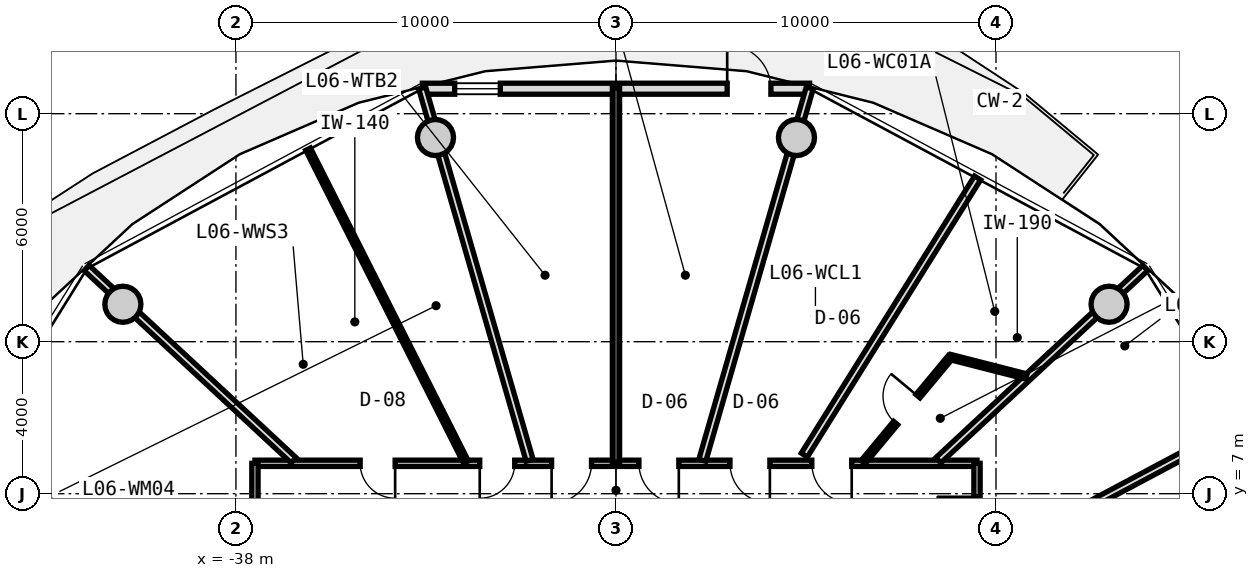
"""IFC4 building model, lengths in metres.
Left out: names, types, materials, properties, quantities, classifications, styles, units other than length and angle.
Written with IfcOpenShell. Run it as: python <this file> out.ifc"""

import sys

from ifc_helpers import new_model, si_unit, direction, frame, frame_2d, origin, origin_2d, place, context, subcontext, project, spatial, rectangle, circle, extrude, source, transform, mapped, element, fill, save


model = new_model("IFC4")
c1 = context("Model", 3, precision=1e-05, world=origin(), true_north=direction((0.0, 1.0)))
c2 = subcontext(c1, "Body", "Model", "MODEL_VIEW")
j1 = project(units=[si_unit("LENGTHUNIT", "METRE"), si_unit("PLANEANGLEUNIT", "RADIAN")], contexts=[c1])
p1 = place(None, origin())
s1 = spatial("IfcSite", under=j1, at=p1, CompositionType="ELEMENT")
p2 = place(p1, origin())
s2 = spatial("IfcBuilding", under=s1, at=p2, CompositionType="ELEMENT")
p3 = place(p2, frame((0.0, 0.0, 24.65)))
s3 = spatial("IfcBuildingStorey", under=s2, at=p3, CompositionType="ELEMENT", Elevation=24.65)
m1 = source(origin(), c2, "Body", "SweptSolid", [
    extrude(circle(Radius=0.475, at=origin_2d()), origin(), (0.0, 0.0, 1.0), 3.05),
])
for number, where, z_axis, x_axis in (
    (1, (-15.025, 11.985, 0.0), (0.0, 0.0, 1.0), (1.0, 0.0, 0.0)),
    (2, (-23.251, 16.373, 0.0), (0.0, 0.0, 1.0), (1.0, 0.0, 0.0)),
    (3, (-32.749, 16.373, 0.0), (0.0, 0.0, 1.0), (1.0, 0.0, 0.0)),
    (4, (-40.975, 11.985, 0.0), (0.0, 0.0, 1.0), (1.0, 0.0, 0.0)),
):
    element("IfcColumn", number, at=place(p3, frame(where, z_axis=z_axis, x_axis=x_axis)), inside=s3, PredefinedType="COLUMN", context=c2, shape_type="MappedRepresentation", body=[
        mapped(m1, transform((0.0, 0.0, 0.0), x_axis=(1.0, 0.0, 0.0), y_axis=(0.0, 1.0, 0.0), z_axis=(0.0, 0.0, 1.0), scale=1.0)),
    ])
m2 = source(origin(), c2, "Body", "SweptSolid", [
    extrude(rectangle(XDim=10.187, YDim=0.29, at=frame_2d((5.094, 0.0))), origin(), (0.0, 0.0, 1.0), 2.79),
])
p4 = place(p3, frame((-33.094, 17.657, 0.0), z_axis=(0.0, 0.0, 1.0), x_axis=(1.0, 0.0, 0.0)))
e5 = element("IfcWall", 5, at=p4, inside=s3, PredefinedType="SOLIDWALL", context=c2, shape_type="MappedRepresentation", body=[
    mapped(m2, transform((0.0, 0.0, 0.0), x_axis=(1.0, 0.0, 0.0), y_axis=(0.0, 1.0, 0.0), z_axis=(0.0, 0.0, 1.0), scale=1.0)),
])
p5 = place(p4, frame((8.02, 0.0, 0.0)))
e6 = element("IfcOpeningElement", 6, at=p5, cuts=e5, PredefinedType="OPENING", context=c2, shape_type="SweptSolid", body=[
    extrude(rectangle(XDim=1.15, YDim=2.25, at=frame_2d((0.575, 1.125))), frame((0.0, 0.155, 0.0), z_axis=(0.0, -1.0, 0.0), x_axis=(1.0, 0.0, 0.0)), (0.0, 0.0, 1.0), 0.31),
])
p6 = place(p4, frame((0.85, 0.0, 0.85)))
e7 = element("IfcOpeningElement", 7, at=p6, cuts=e5, PredefinedType="OPENING", context=c2, shape_type="SweptSolid", body=[
    extrude(rectangle(XDim=1.2, YDim=1.5, at=frame_2d((0.6, 0.75))), frame((0.0, 0.155, 0.0), z_axis=(0.0, -1.0, 0.0), x_axis=(1.0, 0.0, 0.0)), (0.0, 0.0, 1.0), 0.31),
])
m3 = source(origin(), c2, "Body", "SweptSolid", [
    extrude(rectangle(XDim=19.0, YDim=0.165, at=frame_2d((9.5, 0.0))), origin(), (0.0, 0.0, 1.0), 2.775),
])
p7 = place(p3, frame((-37.5, 7.8, 0.0), z_axis=(0.0, 0.0, 1.0), x_axis=(1.0, 0.0, 0.0)))
e8 = element("IfcWall", 8, at=p7, inside=s3, PredefinedType="PARTITIONING", context=c2, shape_type="MappedRepresentation", body=[
    mapped(m3, transform((0.0, 0.0, 0.0), x_axis=(1.0, 0.0, 0.0), y_axis=(0.0, 1.0, 0.0), z_axis=(0.0, 0.0, 1.0), scale=1.0)),
])
p8 = place(p7, frame((14.653, 0.0, 0.0)))
e9 = element("IfcOpeningElement", 9, at=p8, cuts=e8, PredefinedType="OPENING", context=c2, shape_type="SweptSolid", body=[
    extrude(rectangle(XDim=1.05, YDim=2.15, at=frame_2d((0.525, 1.075))), frame((0.0, 0.093, 0.0), z_axis=(0.0, -1.0, 0.0), x_axis=(1.0, 0.0, 0.0)), (0.0, 0.0, 1.0), 0.185),
])
p9 = place(p7, frame((12.5, 0.0, 0.0)))
e10 = element("IfcOpeningElement", 10, at=p9, cuts=e8, PredefinedType="OPENING", context=c2, shape_type="SweptSolid", body=[
    extrude(rectangle(XDim=1.05, YDim=2.15, at=frame_2d((0.525, 1.075))), frame((0.0, 0.093, 0.0), z_axis=(0.0, -1.0, 0.0), x_axis=(1.0, 0.0, 0.0)), (0.0, 0.0, 1.0), 0.185),
])
p10 = place(p7, frame((10.104, 0.0, 0.0)))
e11 = element("IfcOpeningElement", 11, at=p10, cuts=e8, PredefinedType="OPENING", context=c2, shape_type="SweptSolid", body=[
    extrude(rectangle(XDim=1.05, YDim=2.15, at=frame_2d((0.525, 1.075))), frame((0.0, 0.093, 0.0), z_axis=(0.0, -1.0, 0.0), x_axis=(1.0, 0.0, 0.0)), (0.0, 0.0, 1.0), 0.185),
])
p11 = place(p7, frame((7.806, 0.0, 0.0)))
e12 = element("IfcOpeningElement", 12, at=p11, cuts=e8, PredefinedType="OPENING", context=c2, shape_type="SweptSolid", body=[
    extrude(rectangle(XDim=1.05, YDim=2.15, at=frame_2d((0.525, 1.075))), frame((0.0, 0.093, 0.0), z_axis=(0.0, -1.0, 0.0), x_axis=(1.0, 0.0, 0.0)), (0.0, 0.0, 1.0), 0.185),
])
p12 = place(p7, frame((5.915, 0.0, 0.0)))
e13 = element("IfcOpeningElement", 13, at=p12, cuts=e8, PredefinedType="OPENING", context=c2, shape_type="SweptSolid", body=[
    extrude(rectangle(XDim=0.92, YDim=2.1, at=frame_2d((0.46, 1.05))), frame((0.0, 0.093, 0.0), z_axis=(0.0, -1.0, 0.0), x_axis=(1.0, 0.0, 0.0)), (0.0, 0.0, 1.0), 0.185),
])
p13 = place(p7, frame((2.769, 0.0, 0.0)))
e14 = element("IfcOpeningElement", 14, at=p13, cuts=e8, PredefinedType="OPENING", context=c2, shape_type="SweptSolid", body=[
    extrude(rectangle(XDim=0.92, YDim=2.1, at=frame_2d((0.46, 1.05))), frame((0.0, 0.093, 0.0), z_axis=(0.0, -1.0, 0.0), x_axis=(1.0, 0.0, 0.0)), (0.0, 0.0, 1.0), 0.185),
])
m4 = source(origin(), c2, "Body", "SweptSolid", [
    extrude(rectangle(XDim=15.6, YDim=0.165, at=frame_2d((7.8, 0.0))), origin(), (0.0, 0.0, 1.0), 2.775),
])
p14 = place(p3, frame((-37.5, -7.8, 0.0), z_axis=(0.0, 0.0, 1.0), x_axis=(0.0, 1.0, 0.0)))
e15 = element("IfcWall", 15, at=p14, inside=s3, PredefinedType="PARTITIONING", context=c2, shape_type="MappedRepresentation", body=[
    mapped(m4, transform((0.0, 0.0, 0.0), x_axis=(1.0, 0.0, 0.0), y_axis=(0.0, 1.0, 0.0), z_axis=(0.0, 0.0, 1.0), scale=1.0)),
])
p15 = place(p14, frame((12.141, 0.0, 0.0)))
e16 = element("IfcOpeningElement", 16, at=p15, cuts=e15, PredefinedType="OPENING", context=c2, shape_type="SweptSolid", body=[
    extrude(rectangle(XDim=1.25, YDim=2.2, at=frame_2d((0.625, 1.1))), frame((0.0, 0.093, 0.0), z_axis=(0.0, -1.0, 0.0), x_axis=(1.0, 0.0, 0.0)), (0.0, 0.0, 1.0), 0.185),
])
p16 = place(p14, frame((7.175, 0.0, 0.0)))
e17 = element("IfcOpeningElement", 17, at=p16, cuts=e15, PredefinedType="OPENING", context=c2, shape_type="SweptSolid", body=[
    extrude(rectangle(XDim=1.25, YDim=2.2, at=frame_2d((0.625, 1.1))), frame((0.0, 0.093, 0.0), z_axis=(0.0, -1.0, 0.0), x_axis=(1.0, 0.0, 0.0)), (0.0, 0.0, 1.0), 0.185),
])
p17 = place(p14, frame((2.208, 0.0, 0.0)))
e18 = element("IfcOpeningElement", 18, at=p17, cuts=e15, PredefinedType="OPENING", context=c2, shape_type="SweptSolid", body=[
    extrude(rectangle(XDim=1.25, YDim=2.2, at=frame_2d((0.625, 1.1))), frame((0.0, 0.093, 0.0), z_axis=(0.0, -1.0, 0.0), x_axis=(1.0, 0.0, 0.0)), (0.0, 0.0, 1.0), 0.185),
])
p18 = place(p3, frame((-18.5, 7.8, 0.0), z_axis=(0.0, 0.0, 1.0), x_axis=(0.0, -1.0, 0.0)))
e19 = element("IfcWall", 19, at=p18, inside=s3, PredefinedType="PARTITIONING", context=c2, shape_type="MappedRepresentation", body=[
    mapped(m4, transform((0.0, 0.0, 0.0), x_axis=(1.0, 0.0, 0.0), y_axis=(0.0, 1.0, 0.0), z_axis=(0.0, 0.0, 1.0), scale=1.0)),
])
p19 = place(p18, frame((12.141, 0.0, 0.0)))
e20 = element("IfcOpeningElement", 20, at=p19, cuts=e19, PredefinedType="OPENING", context=c2, shape_type="SweptSolid", body=[
    extrude(rectangle(XDim=1.25, YDim=2.2, at=frame_2d((0.625, 1.1))), frame((0.0, 0.093, 0.0), z_axis=(0.0, -1.0, 0.0), x_axis=(1.0, 0.0, 0.0)), (0.0, 0.0, 1.0), 0.185),
])
p20 = place(p18, frame((7.175, 0.0, 0.0)))
e21 = element("IfcOpeningElement", 21, at=p20, cuts=e19, PredefinedType="OPENING", context=c2, shape_type="SweptSolid", body=[
    extrude(rectangle(XDim=1.25, YDim=2.2, at=frame_2d((0.625, 1.1))), frame((0.0, 0.093, 0.0), z_axis=(0.0, -1.0, 0.0), x_axis=(1.0, 0.0, 0.0)), (0.0, 0.0, 1.0), 0.185),
])
p21 = place(p18, frame((2.826, 0.0, 0.0)))
e22 = element("IfcOpeningElement", 22, at=p21, cuts=e19, PredefinedType="OPENING", context=c2, shape_type="SweptSolid", body=[
    extrude(rectangle(XDim=1.05, YDim=2.15, at=frame_2d((0.525, 1.075))), frame((0.0, 0.093, 0.0), z_axis=(0.0, -1.0, 0.0), x_axis=(1.0, 0.0, 0.0)), (0.0, 0.0, 1.0), 0.185),
])
p22 = place(p18, frame((0.881, 0.0, 0.0)))
e23 = element("IfcOpeningElement", 23, at=p22, cuts=e19, PredefinedType="OPENING", context=c2, shape_type="SweptSolid", body=[
    extrude(rectangle(XDim=1.05, YDim=2.15, at=frame_2d((0.525, 1.075))), frame((0.0, 0.093, 0.0), z_axis=(0.0, -1.0, 0.0), x_axis=(1.0, 0.0, 0.0)), (0.0, 0.0, 1.0), 0.185),
])
m5 = source(origin(), c2, "Body", "SweptSolid", [
    extrude(rectangle(XDim=7.435, YDim=0.19, at=frame_2d((3.717, 0.0))), origin(), (0.0, 0.0, 1.0), 2.225),
])
p23 = place(p3, frame((-19.517, 7.88, 0.0), z_axis=(0.0, 0.0, 1.0), x_axis=(0.732651956848, 0.680603489652, 0.0)))
e24 = element("IfcWall", 24, at=p23, inside=s3, PredefinedType="PARTITIONING", context=c2, shape_type="MappedRepresentation", body=[
    mapped(m5, transform((0.0, 0.0, 0.0), x_axis=(1.0, 0.0, 0.0), y_axis=(0.0, 1.0, 0.0), z_axis=(0.0, 0.0, 1.0), scale=1.0)),
])
m6 = source(origin(), c2, "Body", "SweptSolid", [
    extrude(rectangle(XDim=10.196, YDim=0.19, at=frame_2d((5.098, 0.0))), origin(), (0.0, 0.0, 1.0), 2.225),
])
p24 = place(p3, frame((-25.727, 7.88, 0.0), z_axis=(0.0, 0.0, 1.0), x_axis=(0.277136420347, 0.960830580549, 0.0)))
e25 = element("IfcWall", 25, at=p24, inside=s3, PredefinedType="PARTITIONING", context=c2, shape_type="MappedRepresentation", body=[
    mapped(m6, transform((0.0, 0.0, 0.0), x_axis=(1.0, 0.0, 0.0), y_axis=(0.0, 1.0, 0.0), z_axis=(0.0, 0.0, 1.0), scale=1.0)),
])
m7 = source(origin(), c2, "Body", "SweptSolid", [
    extrude(rectangle(XDim=8.598, YDim=0.19, at=frame_2d((4.299, 0.0))), origin(), (0.0, 0.0, 1.0), 2.775),
])
p25 = place(p3, frame((-23.043, 8.017, 0.0), z_axis=(0.0, 0.0, 1.0), x_axis=(0.530039776395, 0.847972779893, 0.0)))
e26 = element("IfcWall", 26, at=p25, inside=s3, PredefinedType="PARTITIONING", context=c2, shape_type="MappedRepresentation", body=[
    mapped(m7, transform((0.0, 0.0, 0.0), x_axis=(1.0, 0.0, 0.0), y_axis=(0.0, 1.0, 0.0), z_axis=(0.0, 0.0, 1.0), scale=1.0)),
])
m8 = source(origin(), c2, "Body", "SweptSolid", [
    extrude(rectangle(XDim=3.594, YDim=0.14, at=frame_2d((1.797, 0.0))), origin(), (0.0, 0.0, 1.0), 2.775),
])
p26 = place(p3, frame((-21.496, 7.83, 0.0), z_axis=(0.0, 0.0, 1.0), x_axis=(0.639001147083, 0.769205781326, 0.0)))
e27 = element("IfcWall", 27, at=p26, inside=s3, PredefinedType="PARTITIONING", context=c2, shape_type="MappedRepresentation", body=[
    mapped(m8, transform((0.0, 0.0, 0.0), x_axis=(1.0, 0.0, 0.0), y_axis=(0.0, 1.0, 0.0), z_axis=(0.0, 0.0, 1.0), scale=1.0)),
])
p27 = place(p26, frame((1.337, 0.0, 0.0)))
e28 = element("IfcOpeningElement", 28, at=p27, cuts=e27, PredefinedType="OPENING", context=c2, shape_type="SweptSolid", body=[
    extrude(rectangle(XDim=0.92, YDim=2.1, at=frame_2d((0.46, 1.05))), frame((0.0, 0.08, 0.0), z_axis=(0.0, -1.0, 0.0), x_axis=(1.0, 0.0, 0.0)), (0.0, 0.0, 1.0), 0.16),
])
m9 = source(origin(), c2, "Body", "SweptSolid", [
    extrude(rectangle(XDim=2.062, YDim=0.14, at=frame_2d((1.031, 0.0))), origin(), (0.0, 0.0, 1.0), 2.415),
])
p28 = place(p3, frame((-19.199, 10.595, 0.0), z_axis=(0.0, 0.0, 1.0), x_axis=(0.968776253543, -0.247936626121, 0.0)))
e29 = element("IfcWall", 29, at=p28, inside=s3, PredefinedType="PARTITIONING", context=c2, shape_type="MappedRepresentation", body=[
    mapped(m9, transform((0.0, 0.0, 0.0), x_axis=(1.0, 0.0, 0.0), y_axis=(0.0, 1.0, 0.0), z_axis=(0.0, 0.0, 1.0), scale=1.0)),
])
p29 = place(p3, frame((-30.273, 7.88, 0.0), z_axis=(0.0, 0.0, 1.0), x_axis=(-0.277136420347, 0.960830580549, 0.0)))
e30 = element("IfcWall", 30, at=p29, inside=s3, PredefinedType="PARTITIONING", context=c2, shape_type="MappedRepresentation", body=[
    mapped(m6, transform((0.0, 0.0, 0.0), x_axis=(1.0, 0.0, 0.0), y_axis=(0.0, 1.0, 0.0), z_axis=(0.0, 0.0, 1.0), scale=1.0)),
])
m10 = source(origin(), c2, "Body", "SweptSolid", [
    extrude(rectangle(XDim=9.846, YDim=0.19, at=frame_2d((4.923, 0.0))), origin(), (0.0, 0.0, 1.0), 2.775),
])
p30 = place(p3, frame((-28.0, 7.83, 0.0), z_axis=(0.0, 0.0, 1.0), x_axis=(0.0, 1.0, 0.0)))
e31 = element("IfcWall", 31, at=p30, inside=s3, PredefinedType="PARTITIONING", context=c2, shape_type="MappedRepresentation", body=[
    mapped(m10, transform((0.0, 0.0, 0.0), x_axis=(1.0, 0.0, 0.0), y_axis=(0.0, 1.0, 0.0), z_axis=(0.0, 0.0, 1.0), scale=1.0)),
])
p31 = place(p3, frame((-36.483, 7.88, 0.0), z_axis=(0.0, 0.0, 1.0), x_axis=(-0.732651956848, 0.680603489652, 0.0)))
e32 = element("IfcWall", 32, at=p31, inside=s3, PredefinedType="PARTITIONING", context=c2, shape_type="MappedRepresentation", body=[
    mapped(m5, transform((0.0, 0.0, 0.0), x_axis=(1.0, 0.0, 0.0), y_axis=(0.0, 1.0, 0.0), z_axis=(0.0, 0.0, 1.0), scale=1.0)),
])
m11 = source(origin(), c2, "Body", "SweptSolid", [
    extrude(rectangle(XDim=9.225, YDim=0.14, at=frame_2d((4.613, 0.0))), origin(), (0.0, 0.0, 1.0), 2.775),
])
p32 = place(p3, frame((-31.946, 7.83, 0.0), z_axis=(0.0, 0.0, 1.0), x_axis=(-0.450460543767, 0.892796336523, 0.0)))
e33 = element("IfcWall", 33, at=p32, inside=s3, PredefinedType="PARTITIONING", context=c2, shape_type="MappedRepresentation", body=[
    mapped(m11, transform((0.0, 0.0, 0.0), x_axis=(1.0, 0.0, 0.0), y_axis=(0.0, 1.0, 0.0), z_axis=(0.0, 0.0, 1.0), scale=1.0)),
])
m12 = source(origin(), c2, "Body", "SweptSolid", [
    extrude(rectangle(XDim=7.677, YDim=0.19, at=frame_2d((3.838, 0.0))), origin(), (0.0, 0.0, 1.0), 2.775),
])
p33 = place(p3, frame((-18.297, 5.231, 0.0), z_axis=(0.0, 0.0, 1.0), x_axis=(0.882725057546, 0.469889851753, 0.0)))
e34 = element("IfcWall", 34, at=p33, inside=s3, PredefinedType="PARTITIONING", context=c2, shape_type="MappedRepresentation", body=[
    mapped(m12, transform((0.0, 0.0, 0.0), x_axis=(1.0, 0.0, 0.0), y_axis=(0.0, 1.0, 0.0), z_axis=(0.0, 0.0, 1.0), scale=1.0)),
])
m13 = source(origin(), c2, "Body", "SweptSolid", [
    extrude(rectangle(XDim=1.15, YDim=2.25, at=frame_2d((0.575, 1.125))), frame((0.0, 0.025, 0.0), z_axis=(0.0, -1.0, 0.0), x_axis=(1.0, 0.0, 0.0)), (0.0, 0.0, 1.0), 0.05),
])
p34 = place(p5, origin())
e35 = element("IfcDoor", 35, at=p34, inside=s3, OperationType="SINGLE_SWING_LEFT", PredefinedType="DOOR", context=c2, shape_type="MappedRepresentation", body=[
    mapped(m13, transform((0.0, 0.0, 0.0), x_axis=(1.0, 0.0, 0.0), y_axis=(0.0, 1.0, 0.0), z_axis=(0.0, 0.0, 1.0), scale=1.0)),
])
fill(e6, e35)
m14 = source(origin(), c2, "Body", "SweptSolid", [
    extrude(rectangle(XDim=1.2, YDim=1.5, at=frame_2d((0.6, 0.75))), frame((0.0, 0.03, 0.0), z_axis=(0.0, -1.0, 0.0), x_axis=(1.0, 0.0, 0.0)), (0.0, 0.0, 1.0), 0.06),
])
p35 = place(p6, origin())
e36 = element("IfcWindow", 36, at=p35, inside=s3, PartitioningType="SINGLE_PANEL", PredefinedType="WINDOW", context=c2, shape_type="MappedRepresentation", body=[
    mapped(m14, transform((0.0, 0.0, 0.0), x_axis=(1.0, 0.0, 0.0), y_axis=(0.0, 1.0, 0.0), z_axis=(0.0, 0.0, 1.0), scale=1.0)),
])
fill(e7, e36)
m15 = source(origin(), c2, "Body", "SweptSolid", [
    extrude(rectangle(XDim=1.05, YDim=2.15, at=frame_2d((0.525, 1.075))), frame((0.0, 0.025, 0.0), z_axis=(0.0, -1.0, 0.0), x_axis=(1.0, 0.0, 0.0)), (0.0, 0.0, 1.0), 0.05),
])
p36 = place(p8, frame((1.05, 0.0, 0.0), z_axis=(0.0, 0.0, 1.0), x_axis=(-1.0, 0.0, 0.0)))
e37 = element("IfcDoor", 37, at=p36, inside=s3, OperationType="SINGLE_SWING_LEFT", PredefinedType="DOOR", context=c2, shape_type="MappedRepresentation", body=[
    mapped(m15, transform((0.0, 0.0, 0.0), x_axis=(1.0, 0.0, 0.0), y_axis=(0.0, 1.0, 0.0), z_axis=(0.0, 0.0, 1.0), scale=1.0)),
])
fill(e9, e37)
m16 = source(origin(), c2, "Body", "SweptSolid", [
    extrude(rectangle(XDim=0.92, YDim=2.1, at=frame_2d((0.46, 1.05))), frame((0.0, 0.025, 0.0), z_axis=(0.0, -1.0, 0.0), x_axis=(1.0, 0.0, 0.0)), (0.0, 0.0, 1.0), 0.05),
])
p37 = place(p27, origin())
e38 = element("IfcDoor", 38, at=p37, inside=s3, OperationType="SINGLE_SWING_RIGHT", PredefinedType="DOOR", context=c2, shape_type="MappedRepresentation", body=[
    mapped(m16, transform((0.0, 0.0, 0.0), x_axis=(1.0, 0.0, 0.0), y_axis=(0.0, 1.0, 0.0), z_axis=(0.0, 0.0, 1.0), scale=1.0)),
])
fill(e28, e38)
p38 = place(p9, frame((1.05, 0.0, 0.0), z_axis=(0.0, 0.0, 1.0), x_axis=(-1.0, 0.0, 0.0)))
e39 = element("IfcDoor", 39, at=p38, inside=s3, OperationType="SINGLE_SWING_LEFT", PredefinedType="DOOR", context=c2, shape_type="MappedRepresentation", body=[
    mapped(m15, transform((0.0, 0.0, 0.0), x_axis=(1.0, 0.0, 0.0), y_axis=(0.0, 1.0, 0.0), z_axis=(0.0, 0.0, 1.0), scale=1.0)),
])
fill(e10, e39)
p39 = place(p10, frame((1.05, 0.0, 0.0), z_axis=(0.0, 0.0, 1.0), x_axis=(-1.0, 0.0, 0.0)))
e40 = element("IfcDoor", 40, at=p39, inside=s3, OperationType="SINGLE_SWING_LEFT", PredefinedType="DOOR", context=c2, shape_type="MappedRepresentation", body=[
    mapped(m15, transform((0.0, 0.0, 0.0), x_axis=(1.0, 0.0, 0.0), y_axis=(0.0, 1.0, 0.0), z_axis=(0.0, 0.0, 1.0), scale=1.0)),
])
fill(e11, e40)
p40 = place(p11, frame((1.05, 0.0, 0.0), z_axis=(0.0, 0.0, 1.0), x_axis=(-1.0, 0.0, 0.0)))
e41 = element("IfcDoor", 41, at=p40, inside=s3, OperationType="SINGLE_SWING_RIGHT", PredefinedType="DOOR", context=c2, shape_type="MappedRepresentation", body=[
    mapped(m15, transform((0.0, 0.0, 0.0), x_axis=(1.0, 0.0, 0.0), y_axis=(0.0, 1.0, 0.0), z_axis=(0.0, 0.0, 1.0), scale=1.0)),
])
fill(e12, e41)
p41 = place(p12, frame((0.92, 0.0, 0.0), z_axis=(0.0, 0.0, 1.0), x_axis=(-1.0, 0.0, 0.0)))
e42 = element("IfcDoor", 42, at=p41, inside=s3, OperationType="SINGLE_SWING_RIGHT", PredefinedType="DOOR", context=c2, shape_type="MappedRepresentation", body=[
    mapped(m16, transform((0.0, 0.0, 0.0), x_axis=(1.0, 0.0, 0.0), y_axis=(0.0, 1.0, 0.0), z_axis=(0.0, 0.0, 1.0), scale=1.0)),
])
fill(e13, e42)
p42 = place(p13, frame((0.92, 0.0, 0.0), z_axis=(0.0, 0.0, 1.0), x_axis=(-1.0, 0.0, 0.0)))
e43 = element("IfcDoor", 43, at=p42, inside=s3, OperationType="SINGLE_SWING_LEFT", PredefinedType="DOOR", context=c2, shape_type="MappedRepresentation", body=[
    mapped(m16, transform((0.0, 0.0, 0.0), x_axis=(1.0, 0.0, 0.0), y_axis=(0.0, 1.0, 0.0), z_axis=(0.0, 0.0, 1.0), scale=1.0)),
])
fill(e14, e43)
p43 = place(p22, frame((1.05, 0.0, 0.0), z_axis=(0.0, 0.0, 1.0), x_axis=(-1.0, 0.0, 0.0)))
e44 = element("IfcDoor", 44, at=p43, inside=s3, OperationType="SINGLE_SWING_RIGHT", PredefinedType="DOOR", context=c2, shape_type="MappedRepresentation", body=[
    mapped(m15, transform((0.0, 0.0, 0.0), x_axis=(1.0, 0.0, 0.0), y_axis=(0.0, 1.0, 0.0), z_axis=(0.0, 0.0, 1.0), scale=1.0)),
])
fill(e23, e44)
save(model, sys.argv[1])
